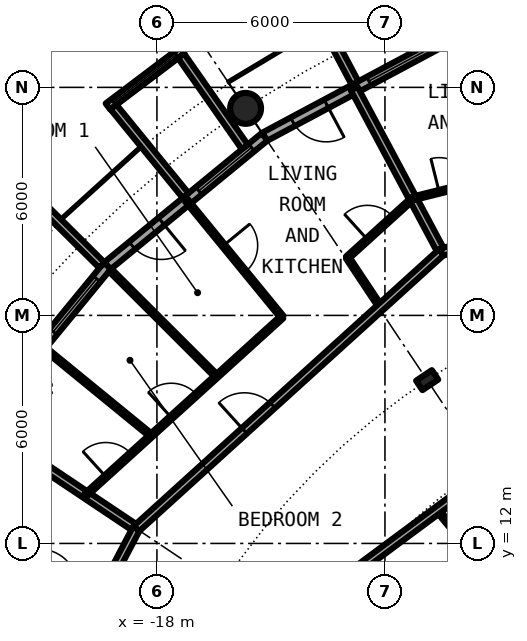
"""IFC4 building model, lengths in metres.
Left out: names, types, materials, properties, quantities, classifications, styles, units other than length and angle.
Written with IfcOpenShell. Run it as: python <this file> out.ifc"""

import sys

from ifc_helpers import new_model, si_unit, direction, frame, frame_2d, origin, origin_2d, place, context, subcontext, project, spatial, rectangle, circle, hollow_circle, i_section, extrude, element, fill, save


model = new_model("IFC4")
c1 = context("Model", 3, precision=1e-05, world=origin(), true_north=direction((0.0, 1.0)))
c2 = subcontext(c1, "Body", "Model", "MODEL_VIEW")
j1 = project(units=[si_unit("LENGTHUNIT", "METRE"), si_unit("PLANEANGLEUNIT", "RADIAN")], contexts=[c1])
p1 = place(None, origin())
s1 = spatial("IfcSite", under=j1, at=p1, CompositionType="ELEMENT")
p2 = place(p1, origin())
s2 = spatial("IfcBuilding", under=s1, at=p2, CompositionType="ELEMENT")
p3 = place(p2, frame((0.0, 0.0, 151.3)))
s3 = spatial("IfcBuildingStorey", under=s2, at=p3, CompositionType="ELEMENT", Elevation=151.3)
p4 = place(p3, frame((-15.667, 23.448, 0.0), z_axis=(0.0, 0.0, 1.0), x_axis=(1.0, 0.0, 0.0)))
e1 = element("IfcColumn", 1, at=p4, inside=s3, PredefinedType="COLUMN", context=c2, shape_type="SweptSolid", body=[
    extrude(hollow_circle(Radius=0.406, WallThickness=0.04, at=origin_2d()), origin(), (0.0, 0.0, 1.0), 3.05),
])
p5 = place(p3, frame((-10.889, 16.297, 0.0), z_axis=(0.0, 0.0, 1.0), x_axis=(-0.55557023302, 0.831469612303, 0.0)))
e2 = element("IfcColumn", 2, at=p5, inside=s3, PredefinedType="COLUMN", context=c2, shape_type="SweptSolid", body=[
    extrude(i_section(OverallWidth=0.3, OverallDepth=0.5, WebThickness=0.014, FlangeThickness=0.028, FilletRadius=0.027, at=origin_2d()), origin(), (0.0, 0.0, 1.0), 3.05),
])
p6 = place(p3, frame((-10.447, 25.222, 0.0), z_axis=(0.0, 0.0, 1.0), x_axis=(-0.881915646801, -0.471407246368, 0.0)))
e3 = element("IfcWall", 3, at=p6, inside=s3, PredefinedType="SOLIDWALL", context=c2, shape_type="SweptSolid", body=[
    extrude(rectangle(XDim=5.352, YDim=0.25, at=frame_2d((2.676, 0.0))), origin(), (0.0, 0.0, 1.0), 2.7),
])
p7 = place(p6, frame((0.441, 0.0, 0.3)))
e4 = element("IfcOpeningElement", 4, at=p7, cuts=e3, PredefinedType="OPENING", context=c2, shape_type="SweptSolid", body=[
    extrude(rectangle(XDim=1.8, YDim=2.1, at=frame_2d((0.9, 1.05))), frame((0.0, 0.135, 0.0), z_axis=(0.0, -1.0, 0.0), x_axis=(1.0, 0.0, 0.0)), (0.0, 0.0, 1.0), 0.27),
])
p8 = place(p6, frame((3.51, 0.0, 0.0)))
e5 = element("IfcOpeningElement", 5, at=p8, cuts=e3, PredefinedType="OPENING", context=c2, shape_type="SweptSolid", body=[
    extrude(rectangle(XDim=1.0, YDim=2.2, at=frame_2d((0.5, 1.1))), frame((0.0, 0.135, 0.0), z_axis=(0.0, -1.0, 0.0), x_axis=(1.0, 0.0, 0.0)), (0.0, 0.0, 1.0), 0.27),
])
p9 = place(p3, frame((-12.787, 24.113, -0.03), z_axis=(0.0, 0.0, 1.0), x_axis=(-0.468365282436, 0.883534924159, 0.0)))
e6 = element("IfcWall", 6, at=p9, inside=s3, PredefinedType="SOLIDWALL", context=c2, shape_type="SweptSolid", body=[
    extrude(rectangle(XDim=3.006, YDim=0.2, at=frame_2d((1.503, 0.0))), origin(), (0.0, 0.0, 1.0), 2.73),
])
p10 = place(p3, frame((-15.167, 22.699, 0.0), z_axis=(0.0, 0.0, 1.0), x_axis=(-0.773019449054, -0.634382322723, 0.0)))
e7 = element("IfcWall", 7, at=p10, inside=s3, PredefinedType="SOLIDWALL", context=c2, shape_type="SweptSolid", body=[
    extrude(rectangle(XDim=5.352, YDim=0.25, at=frame_2d((2.676, 0.0))), origin(), (0.0, 0.0, 1.0), 2.7),
])
p11 = place(p10, frame((0.441, 0.0, 0.3)))
e8 = element("IfcOpeningElement", 8, at=p11, cuts=e7, PredefinedType="OPENING", context=c2, shape_type="SweptSolid", body=[
    extrude(rectangle(XDim=1.8, YDim=2.1, at=frame_2d((0.9, 1.05))), frame((0.0, 0.135, 0.0), z_axis=(0.0, -1.0, 0.0), x_axis=(1.0, 0.0, 0.0)), (0.0, 0.0, 1.0), 0.27),
])
p12 = place(p10, frame((3.51, 0.0, 0.0)))
e9 = element("IfcOpeningElement", 9, at=p12, cuts=e7, PredefinedType="OPENING", context=c2, shape_type="SweptSolid", body=[
    extrude(rectangle(XDim=1.0, YDim=2.2, at=frame_2d((0.5, 1.1))), frame((0.0, 0.135, 0.0), z_axis=(0.0, -1.0, 0.0), x_axis=(1.0, 0.0, 0.0)), (0.0, 0.0, 1.0), 0.27),
])
p13 = place(p3, frame((-17.337, 24.972, -0.03), z_axis=(0.0, 0.0, 1.0), x_axis=(-0.797887588059, -0.602806268067, 0.0)))
e10 = element("IfcWall", 10, at=p13, inside=s3, PredefinedType="SOLIDWALL", context=c2, shape_type="SweptSolid", body=[
    extrude(rectangle(XDim=2.447, YDim=0.2, at=frame_2d((1.223, 0.0))), origin(), (0.0, 0.0, 1.0), 2.73),
])
p14 = place(p13, frame((0.183, 0.0, 0.33)))
e11 = element("IfcOpeningElement", 11, at=p14, cuts=e10, PredefinedType="OPENING", context=c2, shape_type="SweptSolid", body=[
    extrude(circle(Radius=1.04, at=frame_2d((1.04, 1.04))), frame((0.0, 0.11, 0.0), z_axis=(0.0, -1.0, 0.0), x_axis=(1.0, 0.0, 0.0)), (0.0, 0.0, 1.0), 0.22),
])
p15 = place(p3, frame((-15.688, 22.433, -0.03), z_axis=(0.0, 0.0, 1.0), x_axis=(-0.573260687834, 0.819373043115, 0.0)))
e12 = element("IfcWall", 12, at=p15, inside=s3, PredefinedType="SOLIDWALL", context=c2, shape_type="SweptSolid", body=[
    extrude(rectangle(XDim=2.925, YDim=0.2, at=frame_2d((1.463, 0.0))), origin(), (0.0, 0.0, 1.0), 2.73),
])
p16 = place(p3, frame((-17.246, 21.155, -0.03), z_axis=(0.0, 0.0, 1.0), x_axis=(-0.631741648902, 0.775179004516, 0.0)))
e13 = element("IfcWall", 13, at=p16, inside=s3, PredefinedType="SOLIDWALL", context=c2, shape_type="SweptSolid", body=[
    extrude(rectangle(XDim=3.006, YDim=0.2, at=frame_2d((1.503, 0.0))), origin(), (0.0, 0.0, 1.0), 2.73),
])
p17 = place(p3, frame((-19.304, 19.304, 0.0), z_axis=(0.0, 0.0, 1.0), x_axis=(-0.634382322723, -0.773019449054, 0.0)))
e14 = element("IfcWall", 14, at=p17, inside=s3, PredefinedType="SOLIDWALL", context=c2, shape_type="SweptSolid", body=[
    extrude(rectangle(XDim=5.352, YDim=0.25, at=frame_2d((2.676, 0.0))), origin(), (0.0, 0.0, 1.0), 2.7),
])
p18 = place(p17, frame((0.441, 0.0, 0.3)))
e15 = element("IfcOpeningElement", 15, at=p18, cuts=e14, PredefinedType="OPENING", context=c2, shape_type="SweptSolid", body=[
    extrude(rectangle(XDim=1.8, YDim=2.1, at=frame_2d((0.9, 1.05))), frame((0.0, 0.135, 0.0), z_axis=(0.0, -1.0, 0.0), x_axis=(1.0, 0.0, 0.0)), (0.0, 0.0, 1.0), 0.27),
])
p19 = place(p17, frame((3.51, 0.0, 0.0)))
e16 = element("IfcOpeningElement", 16, at=p19, cuts=e14, PredefinedType="OPENING", context=c2, shape_type="SweptSolid", body=[
    extrude(rectangle(XDim=1.0, YDim=2.2, at=frame_2d((0.5, 1.1))), frame((0.0, 0.135, 0.0), z_axis=(0.0, -1.0, 0.0), x_axis=(1.0, 0.0, 0.0)), (0.0, 0.0, 1.0), 0.27),
])
p20 = place(p3, frame((-19.45, 19.323, -0.03), z_axis=(0.0, 0.0, 1.0), x_axis=(-0.709727076896, 0.704476739375, 0.0)))
e17 = element("IfcWall", 17, at=p20, inside=s3, PredefinedType="SOLIDWALL", context=c2, shape_type="SweptSolid", body=[
    extrude(rectangle(XDim=2.883, YDim=0.2, at=frame_2d((1.441, 0.0))), origin(), (0.0, 0.0, 1.0), 2.73),
])
p21 = place(p3, frame((-12.984, 19.521, 0.0), z_axis=(0.0, 0.0, 1.0), x_axis=(0.55373148684, -0.832695286694, 0.0)))
e18 = element("IfcWall", 18, at=p21, inside=s3, PredefinedType="PARTITIONING", context=c2, shape_type="SweptSolid", body=[
    extrude(rectangle(XDim=1.571, YDim=0.1, at=frame_2d((0.786, 0.0))), origin(), (0.0, 0.0, 1.0), 2.7),
])
p22 = place(p3, frame((-22.595, 15.098, 0.0), z_axis=(0.0, 0.0, 1.0), x_axis=(0.831387096605, -0.55569370664, 0.0)))
e19 = element("IfcWall", 19, at=p22, inside=s3, PredefinedType="PARTITIONING", context=c2, shape_type="SweptSolid", body=[
    extrude(rectangle(XDim=4.875, YDim=0.2, at=frame_2d((2.438, 0.0))), origin(), (0.0, 0.0, 1.0), 2.7),
])
p23 = place(p3, frame((-21.04, 17.199, 0.0), z_axis=(0.0, 0.0, 1.0), x_axis=(0.774321581607, -0.63279229472, 0.0)))
e20 = element("IfcWall", 20, at=p23, inside=s3, PredefinedType="PARTITIONING", context=c2, shape_type="SweptSolid", body=[
    extrude(rectangle(XDim=3.731, YDim=0.1, at=frame_2d((1.866, 0.0))), origin(), (0.0, 0.0, 1.0), 2.7),
])
p24 = place(p3, frame((-19.234, 19.197, 0.0), z_axis=(0.0, 0.0, 1.0), x_axis=(0.707722727509, -0.706490297858, 0.0)))
e21 = element("IfcWall", 21, at=p24, inside=s3, PredefinedType="PARTITIONING", context=c2, shape_type="SweptSolid", body=[
    extrude(rectangle(XDim=3.962, YDim=0.1, at=frame_2d((1.981, 0.0))), origin(), (0.0, 0.0, 1.0), 2.7),
])
p25 = place(p3, frame((-17.219, 21.023, 0.0), z_axis=(0.0, 0.0, 1.0), x_axis=(0.633590098448, -0.773668913133, 0.0)))
e22 = element("IfcWall", 22, at=p25, inside=s3, PredefinedType="PARTITIONING", context=c2, shape_type="SweptSolid", body=[
    extrude(rectangle(XDim=3.962, YDim=0.1, at=frame_2d((1.981, 0.0))), origin(), (0.0, 0.0, 1.0), 2.7),
])
p26 = place(p25, frame((1.531, 0.0, 0.0)))
e23 = element("IfcOpeningElement", 23, at=p26, cuts=e22, PredefinedType="OPENING", context=c2, shape_type="SweptSolid", body=[
    extrude(rectangle(XDim=0.9, YDim=2.3, at=frame_2d((0.45, 1.15))), frame((0.0, 0.06, 0.0), z_axis=(0.0, -1.0, 0.0), x_axis=(1.0, 0.0, 0.0)), (0.0, 0.0, 1.0), 0.12),
])
p27 = place(p3, frame((-12.809, 23.966, 0.0), z_axis=(0.0, 0.0, 1.0), x_axis=(0.471271812246, -0.881988026553, 0.0)))
e24 = element("IfcWall", 24, at=p27, inside=s3, PredefinedType="PARTITIONING", context=c2, shape_type="SweptSolid", body=[
    extrude(rectangle(XDim=4.874, YDim=0.2, at=frame_2d((2.437, 0.0))), origin(), (0.0, 0.0, 1.0), 2.7),
])
p28 = place(p3, frame((-10.616, 12.875, 0.0), z_axis=(0.0, 0.0, 1.0), x_axis=(0.636045954217, -0.771651180342, 0.0)))
e25 = element("IfcWall", 25, at=p28, inside=s3, PredefinedType="PARTITIONING", context=c2, shape_type="SweptSolid", body=[
    extrude(rectangle(XDim=8.968, YDim=0.1, at=frame_2d((4.484, 0.0))), origin(), (0.0, 0.0, 1.0), 2.7),
])
p29 = place(p28, frame((1.667, 0.0, 0.0)))
e26 = element("IfcOpeningElement", 26, at=p29, cuts=e25, PredefinedType="OPENING", context=c2, shape_type="SweptSolid", body=[
    extrude(rectangle(XDim=0.9, YDim=2.3, at=frame_2d((0.45, 1.15))), frame((0.0, 0.06, 0.0), z_axis=(0.0, -1.0, 0.0), x_axis=(1.0, 0.0, 0.0)), (0.0, 0.0, 1.0), 0.12),
])
p30 = place(p28, frame((6.151, 0.0, 0.0)))
e27 = element("IfcOpeningElement", 27, at=p30, cuts=e25, PredefinedType="OPENING", context=c2, shape_type="SweptSolid", body=[
    extrude(rectangle(XDim=0.9, YDim=2.3, at=frame_2d((0.45, 1.15))), frame((0.0, 0.06, 0.0), z_axis=(0.0, -1.0, 0.0), x_axis=(1.0, 0.0, 0.0)), (0.0, 0.0, 1.0), 0.12),
])
p31 = place(p3, frame((-13.349, 10.848, 0.0), z_axis=(0.0, 0.0, 1.0), x_axis=(0.803229232922, 0.595670042371, 0.0)))
e28 = element("IfcWall", 28, at=p31, inside=s3, PredefinedType="PARTITIONING", context=c2, shape_type="SweptSolid", body=[
    extrude(rectangle(XDim=10.224, YDim=0.2, at=frame_2d((5.112, 0.0))), origin(), (0.0, 0.0, 1.0), 2.7),
])
p32 = place(p31, frame((4.612, 0.0, 0.0)))
e29 = element("IfcOpeningElement", 29, at=p32, cuts=e28, PredefinedType="OPENING", context=c2, shape_type="SweptSolid", body=[
    extrude(rectangle(XDim=1.0, YDim=2.3, at=frame_2d((0.5, 1.15))), frame((0.0, 0.11, 0.0), z_axis=(0.0, -1.0, 0.0), x_axis=(1.0, 0.0, 0.0)), (0.0, 0.0, 1.0), 0.22),
])
p33 = place(p3, frame((-18.544, 12.385, 0.0), z_axis=(0.0, 0.0, 1.0), x_axis=(0.740849323054, 0.67167125927, 0.0)))
e30 = element("IfcWall", 30, at=p33, inside=s3, PredefinedType="PARTITIONING", context=c2, shape_type="SweptSolid", body=[
    extrude(rectangle(XDim=10.842, YDim=0.2, at=frame_2d((5.421, 0.0))), origin(), (0.0, 0.0, 1.0), 2.7),
])
p34 = place(p33, frame((3.839, 0.0, 0.0)))
e31 = element("IfcOpeningElement", 31, at=p34, cuts=e30, PredefinedType="OPENING", context=c2, shape_type="SweptSolid", body=[
    extrude(rectangle(XDim=1.0, YDim=2.3, at=frame_2d((0.5, 1.15))), frame((0.0, 0.11, 0.0), z_axis=(0.0, -1.0, 0.0), x_axis=(1.0, 0.0, 0.0)), (0.0, 0.0, 1.0), 0.22),
])
p35 = place(p3, frame((-10.512, 19.667, 0.0), z_axis=(0.0, 0.0, 1.0), x_axis=(0.970086843848, 0.242758141765, 0.0)))
e32 = element("IfcWall", 32, at=p35, inside=s3, PredefinedType="PARTITIONING", context=c2, shape_type="SweptSolid", body=[
    extrude(rectangle(XDim=10.842, YDim=0.2, at=frame_2d((5.421, 0.0))), origin(), (0.0, 0.0, 1.0), 2.7),
])
p36 = place(p35, frame((6.002, 0.0, 0.0)))
e33 = element("IfcOpeningElement", 33, at=p36, cuts=e32, PredefinedType="OPENING", context=c2, shape_type="SweptSolid", body=[
    extrude(rectangle(XDim=1.0, YDim=2.3, at=frame_2d((0.5, 1.15))), frame((0.0, 0.11, 0.0), z_axis=(0.0, -1.0, 0.0), x_axis=(1.0, 0.0, 0.0)), (0.0, 0.0, 1.0), 0.22),
])
p37 = place(p3, frame((-19.307, 10.935, 0.0), z_axis=(0.0, 0.0, 1.0), x_axis=(0.465605550524, 0.884992356646, 0.0)))
e34 = element("IfcWall", 34, at=p37, inside=s3, PredefinedType="PARTITIONING", context=c2, shape_type="SweptSolid", body=[
    extrude(rectangle(XDim=1.643, YDim=0.2, at=frame_2d((0.821, 0.0))), origin(), (0.0, 0.0, 1.0), 2.7),
])
p38 = place(p3, frame((-19.872, 13.278, 0.0), z_axis=(0.0, 0.0, 1.0), x_axis=(0.740923753351, 0.671589153962, 0.0)))
e35 = element("IfcWall", 35, at=p38, inside=s3, PredefinedType="PARTITIONING", context=c2, shape_type="SweptSolid", body=[
    extrude(rectangle(XDim=6.969, YDim=0.1, at=frame_2d((3.484, 0.0))), origin(), (0.0, 0.0, 1.0), 2.7),
])
p39 = place(p38, frame((3.034, 0.0, 0.0)))
e36 = element("IfcOpeningElement", 36, at=p39, cuts=e35, PredefinedType="OPENING", context=c2, shape_type="SweptSolid", body=[
    extrude(rectangle(XDim=0.9, YDim=2.3, at=frame_2d((0.45, 1.15))), frame((0.0, 0.06, 0.0), z_axis=(0.0, -1.0, 0.0), x_axis=(1.0, 0.0, 0.0)), (0.0, 0.0, 1.0), 0.12),
])
p40 = place(p38, frame((0.711, 0.0, 0.0)))
e37 = element("IfcOpeningElement", 37, at=p40, cuts=e35, PredefinedType="OPENING", context=c2, shape_type="SweptSolid", body=[
    extrude(rectangle(XDim=0.9, YDim=2.3, at=frame_2d((0.45, 1.15))), frame((0.0, 0.06, 0.0), z_axis=(0.0, -1.0, 0.0), x_axis=(1.0, 0.0, 0.0)), (0.0, 0.0, 1.0), 0.12),
])
p41 = place(p3, frame((-12.993, 19.513, 0.0), z_axis=(0.0, 0.0, 1.0), x_axis=(0.74087097024, 0.671647381783, 0.0)))
e38 = element("IfcWall", 38, at=p41, inside=s3, PredefinedType="PARTITIONING", context=c2, shape_type="SweptSolid", body=[
    extrude(rectangle(XDim=2.324, YDim=0.1, at=frame_2d((1.162, 0.0))), origin(), (0.0, 0.0, 1.0), 2.7),
])
p42 = place(p41, frame((0.719, 0.0, 0.0)))
e39 = element("IfcOpeningElement", 39, at=p42, cuts=e38, PredefinedType="OPENING", context=c2, shape_type="SweptSolid", body=[
    extrude(rectangle(XDim=0.9, YDim=2.3, at=frame_2d((0.45, 1.15))), frame((0.0, 0.06, 0.0), z_axis=(0.0, -1.0, 0.0), x_axis=(1.0, 0.0, 0.0)), (0.0, 0.0, 1.0), 0.12),
])
p43 = place(p3, frame((-11.266, 21.078, 0.0), z_axis=(0.0, 0.0, 1.0), x_axis=(0.970074595874, 0.242807080706, 0.0)))
e40 = element("IfcWall", 40, at=p43, inside=s3, PredefinedType="PARTITIONING", context=c2, shape_type="SweptSolid", body=[
    extrude(rectangle(XDim=2.328, YDim=0.1, at=frame_2d((1.164, 0.0))), origin(), (0.0, 0.0, 1.0), 2.7),
])
p44 = place(p43, frame((0.714, 0.0, 0.0)))
e41 = element("IfcOpeningElement", 41, at=p44, cuts=e40, PredefinedType="OPENING", context=c2, shape_type="SweptSolid", body=[
    extrude(rectangle(XDim=0.9, YDim=2.3, at=frame_2d((0.45, 1.15))), frame((0.0, 0.06, 0.0), z_axis=(0.0, -1.0, 0.0), x_axis=(1.0, 0.0, 0.0)), (0.0, 0.0, 1.0), 0.12),
])
p45 = place(p7, origin())
e42 = element("IfcWindow", 42, at=p45, inside=s3, PartitioningType="SINGLE_PANEL", PredefinedType="WINDOW", context=c2, shape_type="SweptSolid", body=[
    extrude(rectangle(XDim=1.8, YDim=2.1, at=frame_2d((0.9, 1.05))), frame((0.0, 0.03, 0.0), z_axis=(0.0, -1.0, 0.0), x_axis=(1.0, 0.0, 0.0)), (0.0, 0.0, 1.0), 0.06),
])
fill(e4, e42)
p46 = place(p8, origin())
e43 = element("IfcDoor", 43, at=p46, inside=s3, OperationType="SINGLE_SWING_LEFT", PredefinedType="DOOR", context=c2, shape_type="SweptSolid", body=[
    extrude(rectangle(XDim=1.0, YDim=2.2, at=frame_2d((0.5, 1.1))), frame((0.0, 0.025, 0.0), z_axis=(0.0, -1.0, 0.0), x_axis=(1.0, 0.0, 0.0)), (0.0, 0.0, 1.0), 0.05),
])
fill(e5, e43)
p47 = place(p11, origin())
e44 = element("IfcWindow", 44, at=p47, inside=s3, PartitioningType="SINGLE_PANEL", PredefinedType="WINDOW", context=c2, shape_type="SweptSolid", body=[
    extrude(rectangle(XDim=1.8, YDim=2.1, at=frame_2d((0.9, 1.05))), frame((0.0, 0.03, 0.0), z_axis=(0.0, -1.0, 0.0), x_axis=(1.0, 0.0, 0.0)), (0.0, 0.0, 1.0), 0.06),
])
fill(e8, e44)
p48 = place(p14, origin())
e45 = element("IfcWindow", 45, at=p48, inside=s3, PartitioningType="SINGLE_PANEL", PredefinedType="WINDOW", context=c2, shape_type="SweptSolid", body=[
    extrude(circle(Radius=1.04, at=frame_2d((1.04, 1.04))), frame((0.0, 0.03, 0.0), z_axis=(0.0, -1.0, 0.0), x_axis=(1.0, 0.0, 0.0)), (0.0, 0.0, 1.0), 0.06),
])
fill(e11, e45)
p49 = place(p12, origin())
e46 = element("IfcDoor", 46, at=p49, inside=s3, OperationType="SINGLE_SWING_LEFT", PredefinedType="DOOR", context=c2, shape_type="SweptSolid", body=[
    extrude(rectangle(XDim=1.0, YDim=2.2, at=frame_2d((0.5, 1.1))), frame((0.0, 0.025, 0.0), z_axis=(0.0, -1.0, 0.0), x_axis=(1.0, 0.0, 0.0)), (0.0, 0.0, 1.0), 0.05),
])
fill(e9, e46)
p50 = place(p18, origin())
e47 = element("IfcWindow", 47, at=p50, inside=s3, PartitioningType="SINGLE_PANEL", PredefinedType="WINDOW", context=c2, shape_type="SweptSolid", body=[
    extrude(rectangle(XDim=1.8, YDim=2.1, at=frame_2d((0.9, 1.05))), frame((0.0, 0.03, 0.0), z_axis=(0.0, -1.0, 0.0), x_axis=(1.0, 0.0, 0.0)), (0.0, 0.0, 1.0), 0.06),
])
fill(e15, e47)
p51 = place(p44, origin())
e48 = element("IfcDoor", 48, at=p51, inside=s3, OperationType="SINGLE_SWING_RIGHT", PredefinedType="DOOR", context=c2, shape_type="SweptSolid", body=[
    extrude(rectangle(XDim=0.9, YDim=2.3, at=frame_2d((0.45, 1.15))), frame((0.0, 0.025, 0.0), z_axis=(0.0, -1.0, 0.0), x_axis=(1.0, 0.0, 0.0)), (0.0, 0.0, 1.0), 0.05),
])
fill(e41, e48)
p52 = place(p34, origin())
e49 = element("IfcDoor", 49, at=p52, inside=s3, OperationType="SINGLE_SWING_LEFT", PredefinedType="DOOR", context=c2, shape_type="SweptSolid", body=[
    extrude(rectangle(XDim=1.0, YDim=2.3, at=frame_2d((0.5, 1.15))), frame((0.0, 0.025, 0.0), z_axis=(0.0, -1.0, 0.0), x_axis=(1.0, 0.0, 0.0)), (0.0, 0.0, 1.0), 0.05),
])
fill(e31, e49)
p53 = place(p42, origin())
e50 = element("IfcDoor", 50, at=p53, inside=s3, OperationType="SINGLE_SWING_RIGHT", PredefinedType="DOOR", context=c2, shape_type="SweptSolid", body=[
    extrude(rectangle(XDim=0.9, YDim=2.3, at=frame_2d((0.45, 1.15))), frame((0.0, 0.025, 0.0), z_axis=(0.0, -1.0, 0.0), x_axis=(1.0, 0.0, 0.0)), (0.0, 0.0, 1.0), 0.05),
])
fill(e39, e50)
p54 = place(p26, origin())
e51 = element("IfcDoor", 51, at=p54, inside=s3, OperationType="SINGLE_SWING_LEFT", PredefinedType="DOOR", context=c2, shape_type="SweptSolid", body=[
    extrude(rectangle(XDim=0.9, YDim=2.3, at=frame_2d((0.45, 1.15))), frame((0.0, 0.025, 0.0), z_axis=(0.0, -1.0, 0.0), x_axis=(1.0, 0.0, 0.0)), (0.0, 0.0, 1.0), 0.05),
])
fill(e23, e51)
p55 = place(p39, origin())
e52 = element("IfcDoor", 52, at=p55, inside=s3, OperationType="SINGLE_SWING_RIGHT", PredefinedType="DOOR", context=c2, shape_type="SweptSolid", body=[
    extrude(rectangle(XDim=0.9, YDim=2.3, at=frame_2d((0.45, 1.15))), frame((0.0, 0.025, 0.0), z_axis=(0.0, -1.0, 0.0), x_axis=(1.0, 0.0, 0.0)), (0.0, 0.0, 1.0), 0.05),
])
fill(e36, e52)
p56 = place(p40, origin())
e53 = element("IfcDoor", 53, at=p56, inside=s3, OperationType="SINGLE_SWING_LEFT", PredefinedType="DOOR", context=c2, shape_type="SweptSolid", body=[
    extrude(rectangle(XDim=0.9, YDim=2.3, at=frame_2d((0.45, 1.15))), frame((0.0, 0.025, 0.0), z_axis=(0.0, -1.0, 0.0), x_axis=(1.0, 0.0, 0.0)), (0.0, 0.0, 1.0), 0.05),
])
fill(e37, e53)
save(model, sys.argv[1])
